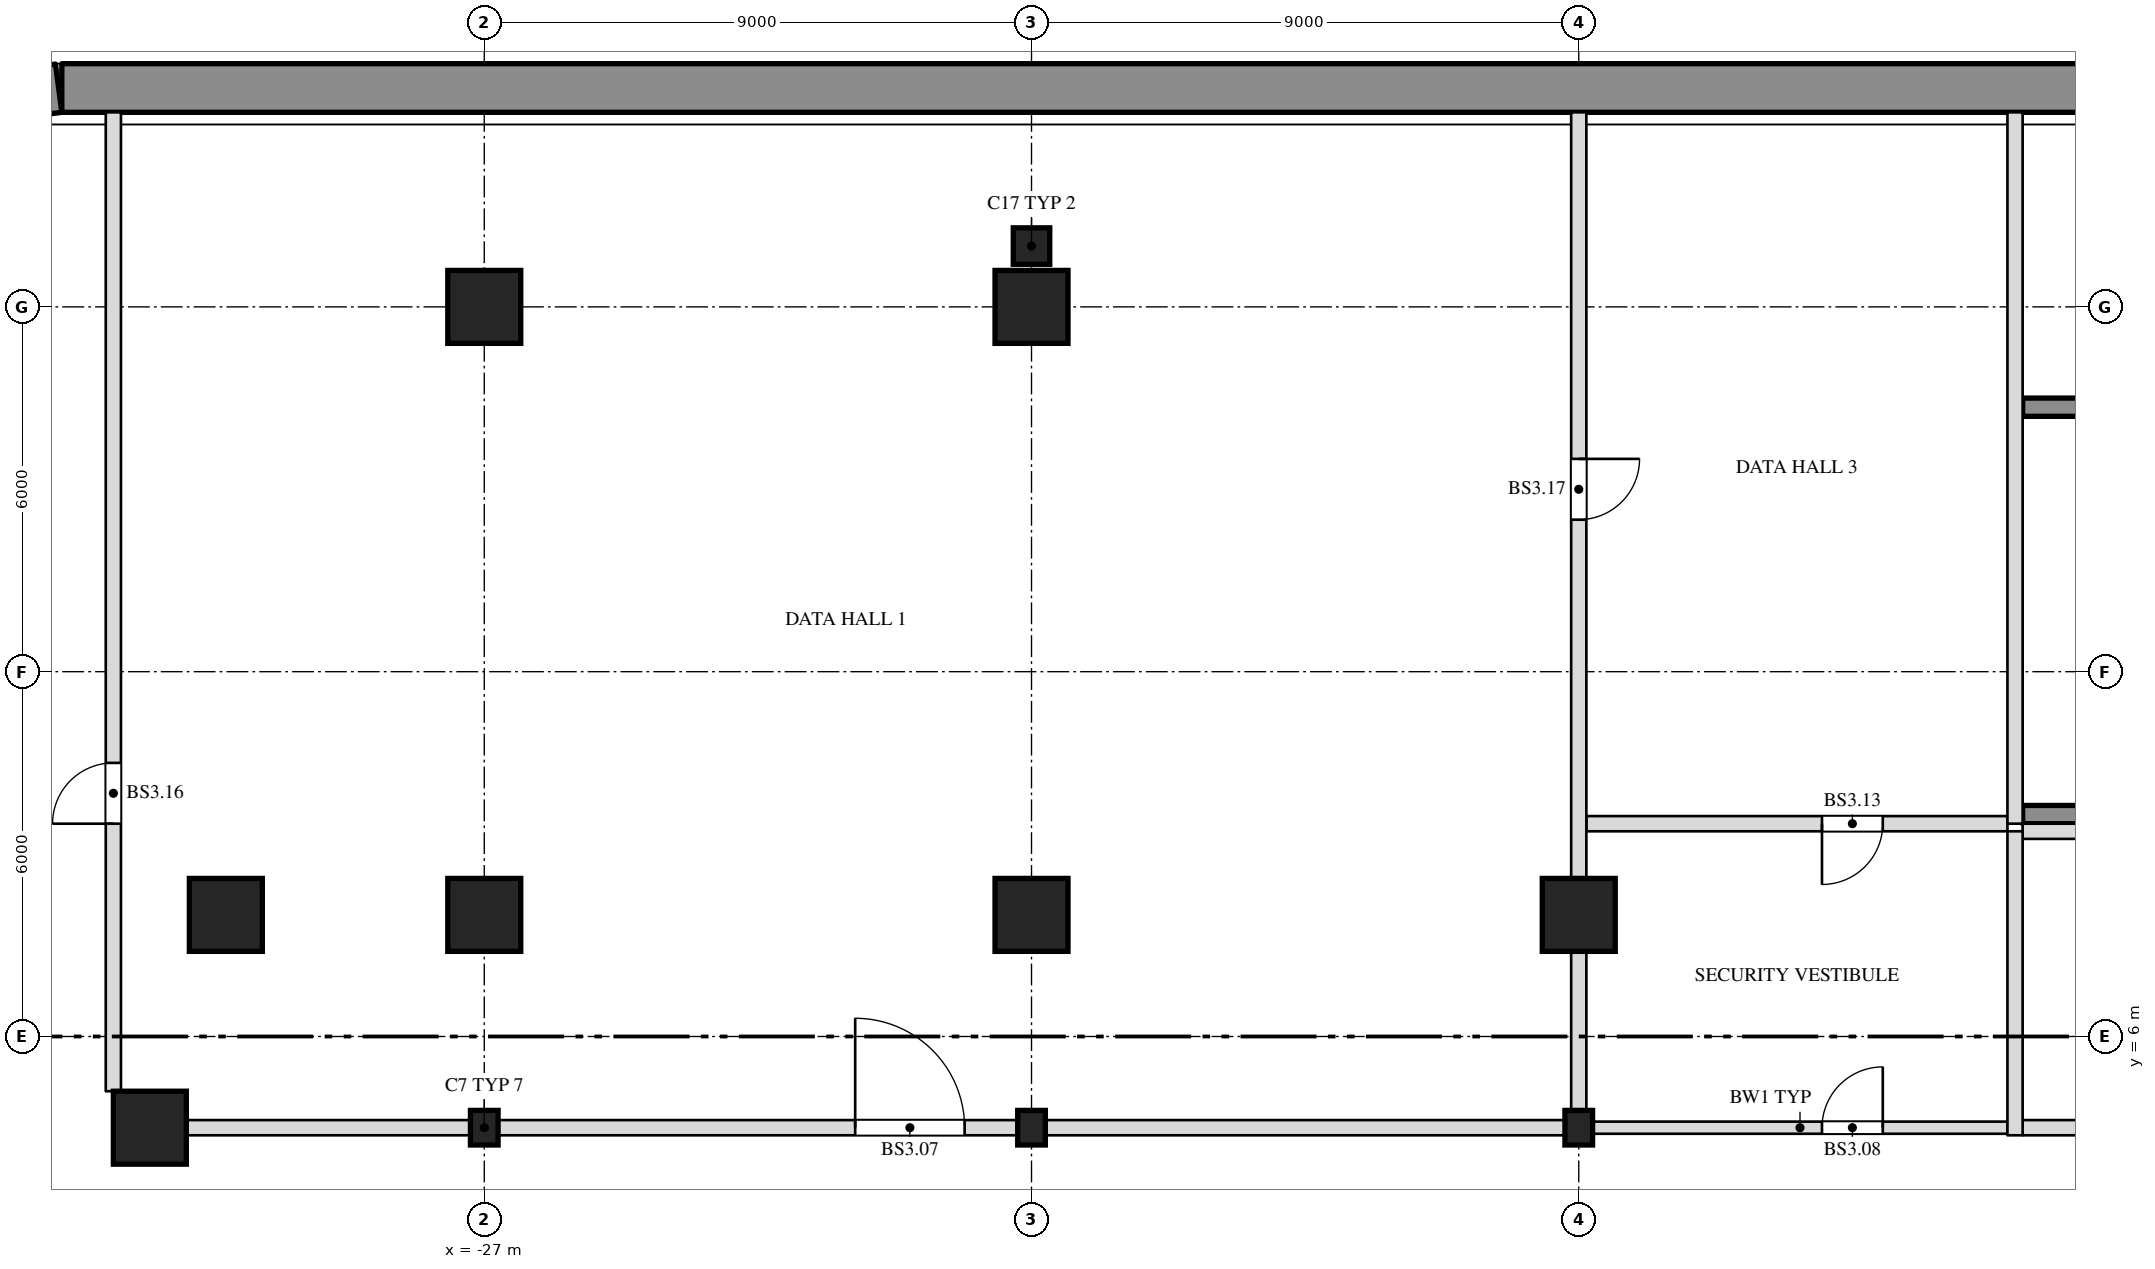
"""IFC4 building model, lengths in metres.
Left out: names, types, materials, properties, quantities, classifications, styles, units other than length and angle.
Written with IfcOpenShell. Run it as: python <this file> out.ifc"""

import sys

from ifc_helpers import new_model, si_unit, direction, frame, frame_2d, origin, origin_2d, place, context, subcontext, project, spatial, rectangle, i_section, extrude, element, fill, save


model = new_model("IFC4")
c1 = context("Model", 3, precision=1e-05, world=origin(), true_north=direction((0.0, 1.0)))
c2 = subcontext(c1, "Body", "Model", "MODEL_VIEW")
j1 = project(units=[si_unit("LENGTHUNIT", "METRE"), si_unit("PLANEANGLEUNIT", "RADIAN")], contexts=[c1])
p1 = place(None, origin())
s1 = spatial("IfcSite", under=j1, at=p1, CompositionType="ELEMENT")
p2 = place(p1, origin())
s2 = spatial("IfcBuilding", under=s1, at=p2, CompositionType="ELEMENT")
p3 = place(p2, frame((0.0, 0.0, -12.6)))
s3 = spatial("IfcBuildingStorey", under=s2, at=p3, CompositionType="ELEMENT", Elevation=-12.6)
p4 = place(p3, frame((-35.396, 21.413, 0.0), z_axis=(0.0, 0.0, 1.0), x_axis=(0.99144603414, 0.130517283865, 0.0)))
e1 = element("IfcWall", 1, at=p4, inside=s3, PredefinedType="SOLIDWALL", context=c2, shape_type="SweptSolid", body=[
    extrude(rectangle(XDim=1.408, YDim=0.8, at=frame_2d((0.704, 0.0))), origin(), (0.0, 0.0, 1.0), 4.2),
])
p5 = place(p3, frame((-33.948, 21.6, 0.0), z_axis=(0.0, 0.0, 1.0), x_axis=(1.0, 0.0, 0.0)))
e2 = element("IfcWall", 2, at=p5, inside=s3, PredefinedType="SOLIDWALL", context=c2, shape_type="SweptSolid", body=[
    extrude(rectangle(XDim=67.895, YDim=0.8, at=frame_2d((33.948, 0.0))), origin(), (0.0, 0.0, 1.0), 4.2),
])
p6 = place(p3, frame((-32.5, 4.5, 0.0), z_axis=(0.0, 0.0, 1.0), x_axis=(1.0, 0.0, 0.0)))
e3 = element("IfcColumn", 3, at=p6, inside=s3, PredefinedType="COLUMN", context=c2, shape_type="SweptSolid", body=[
    extrude(rectangle(XDim=1.2, YDim=1.2, at=origin_2d()), origin(), (0.0, 0.0, 1.0), 4.2),
])
for number, where, z_axis, x_axis in (
    (4, (-27.0, 4.5, 0.0), (0.0, 0.0, 1.0), (1.0, 0.0, 0.0)),
    (5, (-18.0, 4.5, 0.0), (0.0, 0.0, 1.0), (1.0, 0.0, 0.0)),
    (6, (-9.0, 4.5, 0.0), (0.0, 0.0, 1.0), (1.0, 0.0, 0.0)),
):
    element("IfcColumn", number, at=place(p3, frame(where, z_axis=z_axis, x_axis=x_axis)), inside=s3, PredefinedType="COLUMN", context=c2, shape_type="SweptSolid", body=[
        extrude(i_section(OverallWidth=0.455, OverallDepth=0.569, WebThickness=0.078, FlangeThickness=0.125, at=origin_2d()), origin(), (0.0, 0.0, 1.0), 4.2),
    ])
for number, where, z_axis, x_axis in (
    (7, (-31.25, 8.0, 0.0), (0.0, 0.0, 1.0), (1.0, 0.0, 0.0)),
    (8, (-27.0, 8.0, 0.0), (0.0, 0.0, 1.0), (1.0, 0.0, 0.0)),
    (9, (-18.0, 8.0, 0.0), (0.0, 0.0, 1.0), (1.0, 0.0, 0.0)),
    (10, (-9.0, 8.0, 0.0), (0.0, 0.0, 1.0), (1.0, 0.0, 0.0)),
    (11, (-27.0, 18.0, 0.0), (0.0, 0.0, 1.0), (1.0, 0.0, 0.0)),
    (12, (-18.0, 18.0, 0.0), (0.0, 0.0, 1.0), (1.0, 0.0, 0.0)),
):
    element("IfcColumn", number, at=place(p3, frame(where, z_axis=z_axis, x_axis=x_axis)), inside=s3, PredefinedType="COLUMN", context=c2, shape_type="SweptSolid", body=[
        extrude(rectangle(XDim=1.2, YDim=1.2, at=origin_2d()), origin(), (0.0, 0.0, 1.0), 4.2),
    ])
p7 = place(p3, frame((-18.0, 19.0, 0.0), z_axis=(0.0, 0.0, 1.0), x_axis=(1.0, 0.0, 0.0)))
e13 = element("IfcColumn", 13, at=p7, inside=s3, PredefinedType="COLUMN", context=c2, shape_type="SweptSolid", body=[
    extrude(rectangle(XDim=0.6, YDim=0.6, at=origin_2d()), origin(), (0.0, 0.0, 1.0), 4.2),
])
p8 = place(p3, frame((-31.9, 4.5, 0.0), z_axis=(0.0, 0.0, 1.0), x_axis=(1.0, 0.0, 0.0)))
e14 = element("IfcWall", 14, at=p8, inside=s3, PredefinedType="SOLIDWALL", context=c2, shape_type="SweptSolid", body=[
    extrude(rectangle(XDim=4.673, YDim=0.25, at=frame_2d((2.336, 0.0))), origin(), (0.0, 0.0, 1.0), 3.9),
])
p9 = place(p3, frame((-26.773, 4.5, 0.0), z_axis=(0.0, 0.0, 1.0), x_axis=(1.0, 0.0, 0.0)))
e15 = element("IfcWall", 15, at=p9, inside=s3, PredefinedType="SOLIDWALL", context=c2, shape_type="SweptSolid", body=[
    extrude(rectangle(XDim=8.545, YDim=0.25, at=frame_2d((4.273, 0.0))), origin(), (0.0, 0.0, 1.0), 3.9),
])
p10 = place(p9, frame((5.873, 0.0, 0.0)))
e16 = element("IfcOpeningElement", 16, at=p10, cuts=e15, PredefinedType="OPENING", context=c2, shape_type="SweptSolid", body=[
    extrude(rectangle(XDim=1.8, YDim=2.1, at=frame_2d((0.9, 1.05))), frame((0.0, 0.137, 0.0), z_axis=(0.0, -1.0, 0.0), x_axis=(1.0, 0.0, 0.0)), (0.0, 0.0, 1.0), 0.274),
])
p11 = place(p3, frame((-17.773, 4.5, 0.0), z_axis=(0.0, 0.0, 1.0), x_axis=(1.0, 0.0, 0.0)))
e17 = element("IfcWall", 17, at=p11, inside=s3, PredefinedType="SOLIDWALL", context=c2, shape_type="SweptSolid", body=[
    extrude(rectangle(XDim=8.545, YDim=0.25, at=frame_2d((4.273, 0.0))), origin(), (0.0, 0.0, 1.0), 3.9),
])
p12 = place(p3, frame((-8.773, 4.5, 0.0), z_axis=(0.0, 0.0, 1.0), x_axis=(1.0, 0.0, 0.0)))
e18 = element("IfcWall", 18, at=p12, inside=s3, PredefinedType="PARTITIONING", context=c2, shape_type="SweptSolid", body=[
    extrude(rectangle(XDim=6.823, YDim=0.2, at=frame_2d((3.411, 0.0))), origin(), (0.0, 0.0, 1.0), 3.9),
])
p13 = place(p12, frame((3.773, 0.0, 0.0)))
e19 = element("IfcOpeningElement", 19, at=p13, cuts=e18, PredefinedType="OPENING", context=c2, shape_type="SweptSolid", body=[
    extrude(rectangle(XDim=1.0, YDim=2.1, at=frame_2d((0.5, 1.05))), frame((0.0, 0.112, 0.0), z_axis=(0.0, -1.0, 0.0), x_axis=(1.0, 0.0, 0.0)), (0.0, 0.0, 1.0), 0.224),
])
p14 = place(p3, frame((-1.7, 4.5, 0.0), z_axis=(0.0, 0.0, 1.0), x_axis=(1.0, 0.0, 0.0)))
e20 = element("IfcWall", 20, at=p14, inside=s3, PredefinedType="SOLIDWALL", context=c2, shape_type="SweptSolid", body=[
    extrude(rectangle(XDim=1.473, YDim=0.25, at=frame_2d((0.736, 0.0))), origin(), (0.0, 0.0, 1.0), 3.9),
])
p15 = place(p3, frame((-1.7, 9.375, 0.0), z_axis=(0.0, 0.0, 1.0), x_axis=(1.0, 0.0, 0.0)))
e21 = element("IfcWall", 21, at=p15, inside=s3, PredefinedType="SOLIDWALL", context=c2, shape_type="SweptSolid", body=[
    extrude(rectangle(XDim=29.075, YDim=0.25, at=frame_2d((14.538, 0.0))), origin(), (0.0, 0.0, 1.0), 3.9),
])
p16 = place(p3, frame((-8.875, 9.5, 0.0), z_axis=(0.0, 0.0, 1.0), x_axis=(1.0, 0.0, 0.0)))
e22 = element("IfcWall", 22, at=p16, inside=s3, PredefinedType="SOLIDWALL", context=c2, shape_type="SweptSolid", body=[
    extrude(rectangle(XDim=6.925, YDim=0.25, at=frame_2d((3.462, 0.0))), origin(), (0.0, 0.0, 1.0), 3.9),
])
p17 = place(p16, frame((3.875, 0.0, 0.0)))
e23 = element("IfcOpeningElement", 23, at=p17, cuts=e22, PredefinedType="OPENING", context=c2, shape_type="SweptSolid", body=[
    extrude(rectangle(XDim=1.0, YDim=2.1, at=frame_2d((0.5, 1.05))), frame((0.0, 0.137, 0.0), z_axis=(0.0, -1.0, 0.0), x_axis=(1.0, 0.0, 0.0)), (0.0, 0.0, 1.0), 0.274),
])
p18 = place(p3, frame((-33.1, 5.1, 0.0), z_axis=(0.0, 0.0, 1.0), x_axis=(0.0, 1.0, 0.0)))
e24 = element("IfcWall", 24, at=p18, inside=s3, PredefinedType="SOLIDWALL", context=c2, shape_type="SweptSolid", body=[
    extrude(rectangle(XDim=16.1, YDim=0.25, at=frame_2d((8.05, 0.0))), origin(), (0.0, 0.0, 1.0), 3.9),
])
p19 = place(p18, frame((4.4, 0.0, 0.0)))
e25 = element("IfcOpeningElement", 25, at=p19, cuts=e24, PredefinedType="OPENING", context=c2, shape_type="SweptSolid", body=[
    extrude(rectangle(XDim=1.0, YDim=2.1, at=frame_2d((0.5, 1.05))), frame((0.0, 0.137, 0.0), z_axis=(0.0, -1.0, 0.0), x_axis=(1.0, 0.0, 0.0)), (0.0, 0.0, 1.0), 0.274),
])
p20 = place(p3, frame((-9.0, 4.784, 0.0), z_axis=(0.0, 0.0, 1.0), x_axis=(0.0, 1.0, 0.0)))
e26 = element("IfcWall", 26, at=p20, inside=s3, PredefinedType="SOLIDWALL", context=c2, shape_type="SweptSolid", body=[
    extrude(rectangle(XDim=2.615, YDim=0.25, at=frame_2d((1.308, 0.0))), origin(), (0.0, 0.0, 1.0), 3.9),
])
p21 = place(p3, frame((-9.0, 8.6, 0.0), z_axis=(0.0, 0.0, 1.0), x_axis=(0.0, 1.0, 0.0)))
e27 = element("IfcWall", 27, at=p21, inside=s3, PredefinedType="SOLIDWALL", context=c2, shape_type="SweptSolid", body=[
    extrude(rectangle(XDim=12.6, YDim=0.25, at=frame_2d((6.3, 0.0))), origin(), (0.0, 0.0, 1.0), 3.9),
])
p22 = place(p21, frame((5.9, 0.0, 0.0)))
e28 = element("IfcOpeningElement", 28, at=p22, cuts=e27, PredefinedType="OPENING", context=c2, shape_type="SweptSolid", body=[
    extrude(rectangle(XDim=1.0, YDim=2.1, at=frame_2d((0.5, 1.05))), frame((0.0, 0.137, 0.0), z_axis=(0.0, -1.0, 0.0), x_axis=(1.0, 0.0, 0.0)), (0.0, 0.0, 1.0), 0.274),
])
p23 = place(p3, frame((-1.825, 4.375, 0.0), z_axis=(0.0, 0.0, 1.0), x_axis=(0.0, 1.0, 0.0)))
e29 = element("IfcWall", 29, at=p23, inside=s3, PredefinedType="SOLIDWALL", context=c2, shape_type="SweptSolid", body=[
    extrude(rectangle(XDim=5.0, YDim=0.25, at=frame_2d((2.5, 0.0))), origin(), (0.0, 0.0, 1.0), 3.9),
])
p24 = place(p3, frame((-1.825, 9.5, 0.0), z_axis=(0.0, 0.0, 1.0), x_axis=(0.0, 1.0, 0.0)))
e30 = element("IfcWall", 30, at=p24, inside=s3, PredefinedType="SOLIDWALL", context=c2, shape_type="SweptSolid", body=[
    extrude(rectangle(XDim=11.7, YDim=0.25, at=frame_2d((5.85, 0.0))), origin(), (0.0, 0.0, 1.0), 3.9),
])
p25 = place(p3, frame((-1.7, 9.65, 0.0), z_axis=(0.0, 0.0, 1.0), x_axis=(1.0, 0.0, 0.0)))
e31 = element("IfcWall", 31, at=p25, inside=s3, PredefinedType="SOLIDWALL", context=c2, shape_type="SweptSolid", body=[
    extrude(rectangle(XDim=29.075, YDim=0.3, at=frame_2d((14.538, 0.0))), origin(), (0.0, 0.0, 1.0), 4.2),
])
p26 = place(p3, frame((-1.7, 16.35, 0.0), z_axis=(0.0, 0.0, 1.0), x_axis=(1.0, 0.0, 0.0)))
e32 = element("IfcWall", 32, at=p26, inside=s3, PredefinedType="SOLIDWALL", context=c2, shape_type="SweptSolid", body=[
    extrude(rectangle(XDim=28.9, YDim=0.3, at=frame_2d((14.45, 0.0))), origin(), (0.0, 0.0, 1.0), 4.2),
])
p27 = place(p10, origin())
e33 = element("IfcDoor", 33, at=p27, inside=s3, OperationType="DOUBLE_DOOR_SINGLE_SWING", PredefinedType="DOOR", context=c2, shape_type="SweptSolid", body=[
    extrude(rectangle(XDim=1.8, YDim=2.1, at=frame_2d((0.9, 1.05))), frame((0.0, 0.025, 0.0), z_axis=(0.0, -1.0, 0.0), x_axis=(1.0, 0.0, 0.0)), (0.0, 0.0, 1.0), 0.05),
])
fill(e16, e33)
p28 = place(p13, origin())
e34 = element("IfcDoor", 34, at=p28, inside=s3, OperationType="SINGLE_SWING_RIGHT", PredefinedType="DOOR", context=c2, shape_type="SweptSolid", body=[
    extrude(rectangle(XDim=1.0, YDim=2.1, at=frame_2d((0.5, 1.05))), frame((0.0, 0.025, 0.0), z_axis=(0.0, -1.0, 0.0), x_axis=(1.0, 0.0, 0.0)), (0.0, 0.0, 1.0), 0.05),
])
fill(e19, e34)
p29 = place(p17, origin())
e35 = element("IfcDoor", 35, at=p29, inside=s3, OperationType="SINGLE_SWING_RIGHT", PredefinedType="DOOR", context=c2, shape_type="SweptSolid", body=[
    extrude(rectangle(XDim=1.0, YDim=2.1, at=frame_2d((0.5, 1.05))), frame((0.0, 0.025, 0.0), z_axis=(0.0, -1.0, 0.0), x_axis=(1.0, 0.0, 0.0)), (0.0, 0.0, 1.0), 0.05),
])
fill(e23, e35)
p30 = place(p19, origin())
e36 = element("IfcDoor", 36, at=p30, inside=s3, OperationType="SINGLE_SWING_LEFT", PredefinedType="DOOR", context=c2, shape_type="SweptSolid", body=[
    extrude(rectangle(XDim=1.0, YDim=2.1, at=frame_2d((0.5, 1.05))), frame((0.0, 0.025, 0.0), z_axis=(0.0, -1.0, 0.0), x_axis=(1.0, 0.0, 0.0)), (0.0, 0.0, 1.0), 0.05),
])
fill(e25, e36)
p31 = place(p22, origin())
e37 = element("IfcDoor", 37, at=p31, inside=s3, OperationType="SINGLE_SWING_LEFT", PredefinedType="DOOR", context=c2, shape_type="SweptSolid", body=[
    extrude(rectangle(XDim=1.0, YDim=2.1, at=frame_2d((0.5, 1.05))), frame((0.0, 0.025, 0.0), z_axis=(0.0, -1.0, 0.0), x_axis=(1.0, 0.0, 0.0)), (0.0, 0.0, 1.0), 0.05),
])
fill(e28, e37)
save(model, sys.argv[1])
